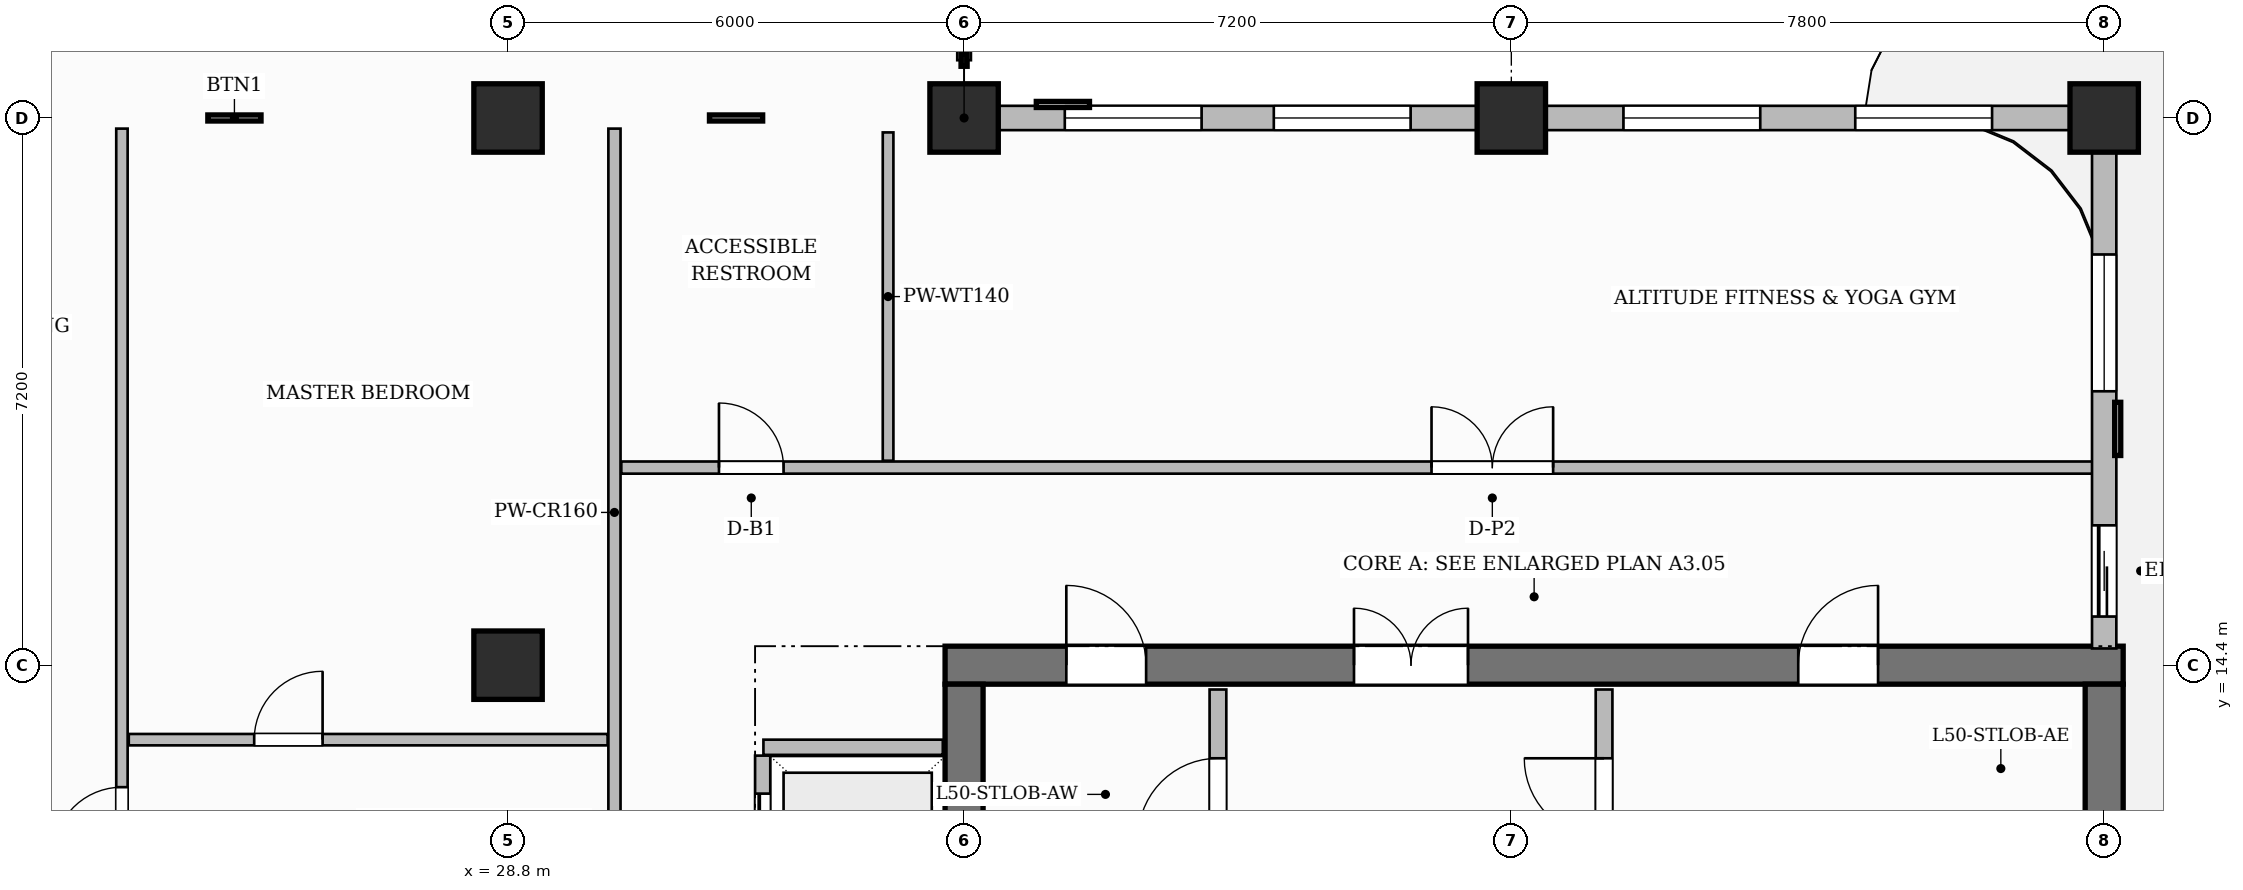
"""IFC4 building model, lengths in metres.
Left out: names, types, materials, properties, quantities, classifications, styles, units other than length and angle.
Written with IfcOpenShell. Run it as: python <this file> out.ifc"""

import sys

from ifc_helpers import new_model, si_unit, direction, frame, frame_2d, origin, origin_2d, place, context, subcontext, project, spatial, rectangle, extrude, source, transform, mapped, element, fill, save


model = new_model("IFC4")
c1 = context("Model", 3, precision=1e-05, world=origin(), true_north=direction((0.0, 1.0)))
c2 = subcontext(c1, "Body", "Model", "MODEL_VIEW")
j1 = project(units=[si_unit("LENGTHUNIT", "METRE"), si_unit("PLANEANGLEUNIT", "RADIAN")], contexts=[c1])
p1 = place(None, origin())
s1 = spatial("IfcSite", under=j1, at=p1, CompositionType="ELEMENT")
p2 = place(p1, origin())
s2 = spatial("IfcBuilding", under=s1, at=p2, CompositionType="ELEMENT")
p3 = place(p2, frame((0.0, 0.0, 201.9)))
s3 = spatial("IfcBuildingStorey", under=s2, at=p3, CompositionType="ELEMENT", Elevation=201.9)
p4 = place(p3, frame((34.55, 14.4, 0.0), z_axis=(0.0, 0.0, 1.0), x_axis=(1.0, 0.0, 0.0)))
e1 = element("IfcWall", 1, at=p4, inside=s3, PredefinedType="SHEAR", context=c2, shape_type="SweptSolid", body=[
    extrude(rectangle(XDim=15.5, YDim=0.5, at=frame_2d((7.75, 0.0))), origin(), (0.0, 0.0, 1.0), 3.85),
])
p5 = place(p4, frame((5.38, 0.0, 0.0)))
e2 = element("IfcOpeningElement", 2, at=p5, cuts=e1, PredefinedType="OPENING", context=c2, shape_type="SweptSolid", body=[
    extrude(rectangle(XDim=1.5, YDim=2.2, at=frame_2d((0.75, 1.1))), frame((0.0, 0.26, 0.0), z_axis=(0.0, -1.0, 0.0), x_axis=(1.0, 0.0, 0.0)), (0.0, 0.0, 1.0), 0.52),
])
p6 = place(p4, frame((1.595, 0.0, 0.0)))
e3 = element("IfcOpeningElement", 3, at=p6, cuts=e1, PredefinedType="OPENING", context=c2, shape_type="SweptSolid", body=[
    extrude(rectangle(XDim=1.05, YDim=2.15, at=frame_2d((0.525, 1.075))), frame((0.0, 0.26, 0.0), z_axis=(0.0, -1.0, 0.0), x_axis=(1.0, 0.0, 0.0)), (0.0, 0.0, 1.0), 0.52),
])
p7 = place(p4, frame((11.225, 0.0, 0.0)))
e4 = element("IfcOpeningElement", 4, at=p7, cuts=e1, PredefinedType="OPENING", context=c2, shape_type="SweptSolid", body=[
    extrude(rectangle(XDim=1.05, YDim=2.15, at=frame_2d((0.525, 1.075))), frame((0.0, 0.26, 0.0), z_axis=(0.0, -1.0, 0.0), x_axis=(1.0, 0.0, 0.0)), (0.0, 0.0, 1.0), 0.52),
])
for number, where, z_axis, x_axis in (
    (5, (34.8, 3.85, 0.0), (0.0, 0.0, 1.0), (0.0, 1.0, 0.0)),
    (6, (49.8, 3.85, 0.0), (0.0, 0.0, 1.0), (0.0, 1.0, 0.0)),
):
    element("IfcWall", number, at=place(p3, frame(where, z_axis=z_axis, x_axis=x_axis)), inside=s3, PredefinedType="SHEAR", context=c2, shape_type="SweptSolid", body=[
        extrude(rectangle(XDim=10.3, YDim=0.5, at=frame_2d((5.15, 0.0))), origin(), (0.0, 0.0, 1.0), 3.85),
    ])
m1 = source(origin(), c2, "Body", "SweptSolid", [
    extrude(rectangle(XDim=0.9, YDim=0.9, at=origin_2d()), origin(), (0.0, 0.0, 1.0), 3.85),
])
for number, where, z_axis, x_axis in (
    (7, (28.8, 14.4, 0.0), (0.0, 0.0, 1.0), (1.0, 0.0, 0.0)),
    (8, (28.8, 21.6, 0.0), (0.0, 0.0, 1.0), (1.0, 0.0, 0.0)),
    (9, (34.8, 21.6, 0.0), (0.0, 0.0, 1.0), (1.0, 0.0, 0.0)),
    (10, (42.0, 21.6, 0.0), (0.0, 0.0, 1.0), (1.0, 0.0, 0.0)),
    (11, (49.8, 21.6, 0.0), (0.0, 0.0, 1.0), (1.0, 0.0, 0.0)),
):
    element("IfcColumn", number, at=place(p3, frame(where, z_axis=z_axis, x_axis=x_axis)), inside=s3, PredefinedType="COLUMN", context=c2, shape_type="MappedRepresentation", body=[
        mapped(m1, transform((0.0, 0.0, 0.0), scale=1.0)),
    ])
p8 = place(p3, frame((38.14, 11.22, 0.0), z_axis=(0.0, 0.0, 1.0), x_axis=(0.0, 1.0, 0.0)))
e12 = element("IfcWall", 12, at=p8, inside=s3, PredefinedType="PARTITIONING", context=c2, shape_type="SweptSolid", body=[
    extrude(rectangle(XDim=2.86, YDim=0.22, at=frame_2d((1.43, 0.0))), origin(), (0.0, 0.0, 1.0), 3.6),
])
p9 = place(p8, frame((0.905, 0.0, 0.0)))
e13 = element("IfcOpeningElement", 13, at=p9, cuts=e12, PredefinedType="OPENING", context=c2, shape_type="SweptSolid", body=[
    extrude(rectangle(XDim=1.05, YDim=2.15, at=frame_2d((0.525, 1.075))), frame((0.0, 0.12, 0.0), z_axis=(0.0, -1.0, 0.0), x_axis=(1.0, 0.0, 0.0)), (0.0, 0.0, 1.0), 0.24),
])
p10 = place(p3, frame((43.22, 11.22, 0.0), z_axis=(0.0, 0.0, 1.0), x_axis=(0.0, 1.0, 0.0)))
e14 = element("IfcWall", 14, at=p10, inside=s3, PredefinedType="PARTITIONING", context=c2, shape_type="SweptSolid", body=[
    extrude(rectangle(XDim=2.86, YDim=0.22, at=frame_2d((1.43, 0.0))), origin(), (0.0, 0.0, 1.0), 3.6),
])
p11 = place(p10, frame((0.905, 0.0, 0.0)))
e15 = element("IfcOpeningElement", 15, at=p11, cuts=e14, PredefinedType="OPENING", context=c2, shape_type="SweptSolid", body=[
    extrude(rectangle(XDim=1.05, YDim=2.15, at=frame_2d((0.525, 1.075))), frame((0.0, 0.12, 0.0), z_axis=(0.0, -1.0, 0.0), x_axis=(1.0, 0.0, 0.0)), (0.0, 0.0, 1.0), 0.24),
])
p12 = place(p3, frame((32.16, 13.32, 0.0), z_axis=(0.0, 0.0, 1.0), x_axis=(1.0, 0.0, 0.0)))
e16 = element("IfcWall", 16, at=p12, inside=s3, PredefinedType="PARTITIONING", context=c2, shape_type="SweptSolid", body=[
    extrude(rectangle(XDim=2.36, YDim=0.2, at=frame_2d((1.18, 0.0))), origin(), (0.0, 0.0, 1.0), 3.6),
])
p13 = place(p3, frame((32.15, 4.39, 0.0), z_axis=(0.0, 0.0, 1.0), x_axis=(0.0, 1.0, 0.0)))
e17 = element("IfcWall", 17, at=p13, inside=s3, PredefinedType="PARTITIONING", context=c2, shape_type="SweptSolid", body=[
    extrude(rectangle(XDim=8.82, YDim=0.2, at=frame_2d((4.41, 0.0))), origin(), (0.0, 0.0, 1.0), 3.6),
])
p14 = place(p13, frame((0.5, 0.0, 0.0)))
e18 = element("IfcOpeningElement", 18, at=p14, cuts=e17, PredefinedType="OPENING", context=c2, shape_type="SweptSolid", body=[
    extrude(rectangle(XDim=1.1, YDim=2.2, at=frame_2d((0.55, 1.1))), frame((0.0, 0.11, 0.0), z_axis=(0.0, -1.0, 0.0), x_axis=(1.0, 0.0, 0.0)), (0.0, 0.0, 1.0), 0.22),
])
p15 = place(p13, frame((2.74, 0.0, 0.0)))
e19 = element("IfcOpeningElement", 19, at=p15, cuts=e17, PredefinedType="OPENING", context=c2, shape_type="SweptSolid", body=[
    extrude(rectangle(XDim=1.1, YDim=2.2, at=frame_2d((0.55, 1.1))), frame((0.0, 0.11, 0.0), z_axis=(0.0, -1.0, 0.0), x_axis=(1.0, 0.0, 0.0)), (0.0, 0.0, 1.0), 0.22),
])
p16 = place(p13, frame((4.98, 0.0, 0.0)))
e20 = element("IfcOpeningElement", 20, at=p16, cuts=e17, PredefinedType="OPENING", context=c2, shape_type="SweptSolid", body=[
    extrude(rectangle(XDim=1.1, YDim=2.2, at=frame_2d((0.55, 1.1))), frame((0.0, 0.11, 0.0), z_axis=(0.0, -1.0, 0.0), x_axis=(1.0, 0.0, 0.0)), (0.0, 0.0, 1.0), 0.22),
])
p17 = place(p13, frame((7.22, 0.0, 0.0)))
e21 = element("IfcOpeningElement", 21, at=p17, cuts=e17, PredefinedType="OPENING", context=c2, shape_type="SweptSolid", body=[
    extrude(rectangle(XDim=1.1, YDim=2.2, at=frame_2d((0.55, 1.1))), frame((0.0, 0.11, 0.0), z_axis=(0.0, -1.0, 0.0), x_axis=(1.0, 0.0, 0.0)), (0.0, 0.0, 1.0), 0.22),
])
p18 = place(p3, frame((30.2, 11.36, 0.0), z_axis=(0.0, 0.0, 1.0), x_axis=(0.0, 1.0, 0.0)))
e22 = element("IfcWall", 22, at=p18, inside=s3, PredefinedType="PARTITIONING", context=c2, shape_type="SweptSolid", body=[
    extrude(rectangle(XDim=10.1, YDim=0.16, at=frame_2d((5.05, 0.0))), origin(), (0.0, 0.0, 1.0), 3.6),
])
p19 = place(p3, frame((30.29, 17.0, 0.0), z_axis=(0.0, 0.0, 1.0), x_axis=(1.0, 0.0, 0.0)))
e23 = element("IfcWall", 23, at=p19, inside=s3, PredefinedType="PARTITIONING", context=c2, shape_type="SweptSolid", body=[
    extrude(rectangle(XDim=19.37, YDim=0.16, at=frame_2d((9.685, 0.0))), origin(), (0.0, 0.0, 1.0), 3.6),
])
p20 = place(p19, frame((1.285, 0.0, 0.0)))
e24 = element("IfcOpeningElement", 24, at=p20, cuts=e23, PredefinedType="OPENING", context=c2, shape_type="SweptSolid", body=[
    extrude(rectangle(XDim=0.85, YDim=2.1, at=frame_2d((0.425, 1.05))), frame((0.0, 0.09, 0.0), z_axis=(0.0, -1.0, 0.0), x_axis=(1.0, 0.0, 0.0)), (0.0, 0.0, 1.0), 0.18),
])
p21 = place(p19, frame((10.66, 0.0, 0.0)))
e25 = element("IfcOpeningElement", 25, at=p21, cuts=e23, PredefinedType="OPENING", context=c2, shape_type="SweptSolid", body=[
    extrude(rectangle(XDim=1.6, YDim=2.4, at=frame_2d((0.8, 1.2))), frame((0.0, 0.09, 0.0), z_axis=(0.0, -1.0, 0.0), x_axis=(1.0, 0.0, 0.0)), (0.0, 0.0, 1.0), 0.18),
])
p22 = place(p3, frame((33.8, 17.09, 0.0), z_axis=(0.0, 0.0, 1.0), x_axis=(0.0, 1.0, 0.0)))
e26 = element("IfcWall", 26, at=p22, inside=s3, PredefinedType="PARTITIONING", context=c2, shape_type="SweptSolid", body=[
    extrude(rectangle(XDim=4.32, YDim=0.14, at=frame_2d((2.16, 0.0))), origin(), (0.0, 0.0, 1.0), 3.6),
])
p23 = place(p3, frame((23.72, 11.36, 0.0), z_axis=(0.0, 0.0, 1.0), x_axis=(0.0, 1.0, 0.0)))
e27 = element("IfcWall", 27, at=p23, inside=s3, PredefinedType="PARTITIONING", context=c2, shape_type="SweptSolid", body=[
    extrude(rectangle(XDim=10.1, YDim=0.15, at=frame_2d((5.05, 0.0))), origin(), (0.0, 0.0, 1.0), 3.6),
])
p24 = place(p23, frame((0.535, 0.0, 0.0)))
e28 = element("IfcOpeningElement", 28, at=p24, cuts=e27, PredefinedType="OPENING", context=c2, shape_type="SweptSolid", body=[
    extrude(rectangle(XDim=0.9, YDim=2.15, at=frame_2d((0.45, 1.075))), frame((0.0, 0.085, 0.0), z_axis=(0.0, -1.0, 0.0), x_axis=(1.0, 0.0, 0.0)), (0.0, 0.0, 1.0), 0.17),
])
p25 = place(p3, frame((23.81, 13.42, 0.0), z_axis=(0.0, 0.0, 1.0), x_axis=(1.0, 0.0, 0.0)))
e29 = element("IfcWall", 29, at=p25, inside=s3, PredefinedType="PARTITIONING", context=c2, shape_type="SweptSolid", body=[
    extrude(rectangle(XDim=6.3, YDim=0.15, at=frame_2d((3.15, 0.0))), origin(), (0.0, 0.0, 1.0), 3.6),
])
p26 = place(p25, frame((1.65, 0.0, 0.0)))
e30 = element("IfcOpeningElement", 30, at=p26, cuts=e29, PredefinedType="OPENING", context=c2, shape_type="SweptSolid", body=[
    extrude(rectangle(XDim=0.9, YDim=2.15, at=frame_2d((0.45, 1.075))), frame((0.0, 0.085, 0.0), z_axis=(0.0, -1.0, 0.0), x_axis=(1.0, 0.0, 0.0)), (0.0, 0.0, 1.0), 0.17),
])
p27 = place(p3, frame((49.8, 14.62, 0.0), z_axis=(0.0, 0.0, 1.0), x_axis=(0.0, 1.0, 0.0)))
e31 = element("IfcWall", 31, at=p27, inside=s3, PredefinedType="SOLIDWALL", context=c2, shape_type="SweptSolid", body=[
    extrude(rectangle(XDim=6.93, YDim=0.32, at=frame_2d((3.465, 0.0))), origin(), (0.0, 0.0, 1.0), 3.085),
])
p28 = place(p27, frame((0.42, 0.0, 0.0)))
e32 = element("IfcOpeningElement", 32, at=p28, cuts=e31, PredefinedType="OPENING", context=c2, shape_type="SweptSolid", body=[
    extrude(rectangle(XDim=1.2, YDim=2.2, at=frame_2d((0.6, 1.1))), frame((0.0, 0.17, 0.0), z_axis=(0.0, -1.0, 0.0), x_axis=(1.0, 0.0, 0.0)), (0.0, 0.0, 1.0), 0.34),
])
p29 = place(p27, frame((3.384, 0.0, 0.8)))
e33 = element("IfcOpeningElement", 33, at=p29, cuts=e31, PredefinedType="OPENING", context=c2, shape_type="SweptSolid", body=[
    extrude(rectangle(XDim=1.8, YDim=1.85, at=frame_2d((0.9, 0.925))), frame((0.0, 0.17, 0.0), z_axis=(0.0, -1.0, 0.0), x_axis=(1.0, 0.0, 0.0)), (0.0, 0.0, 1.0), 0.34),
])
p30 = place(p3, frame((34.8, 21.6, 0.0), z_axis=(0.0, 0.0, 1.0), x_axis=(1.0, 0.0, 0.0)))
e34 = element("IfcWall", 34, at=p30, inside=s3, PredefinedType="SOLIDWALL", context=c2, shape_type="SweptSolid", body=[
    extrude(rectangle(XDim=15.0, YDim=0.32, at=frame_2d((7.5, 0.0))), origin(), (0.0, 0.0, 1.0), 3.085),
])
p31 = place(p30, frame((1.325, 0.0, 0.8)))
e35 = element("IfcOpeningElement", 35, at=p31, cuts=e34, PredefinedType="OPENING", context=c2, shape_type="SweptSolid", body=[
    extrude(rectangle(XDim=1.8, YDim=1.85, at=frame_2d((0.9, 0.925))), frame((0.0, 0.17, 0.0), z_axis=(0.0, -1.0, 0.0), x_axis=(1.0, 0.0, 0.0)), (0.0, 0.0, 1.0), 0.34),
])
p32 = place(p30, frame((4.075, 0.0, 0.8)))
e36 = element("IfcOpeningElement", 36, at=p32, cuts=e34, PredefinedType="OPENING", context=c2, shape_type="SweptSolid", body=[
    extrude(rectangle(XDim=1.8, YDim=1.85, at=frame_2d((0.9, 0.925))), frame((0.0, 0.17, 0.0), z_axis=(0.0, -1.0, 0.0), x_axis=(1.0, 0.0, 0.0)), (0.0, 0.0, 1.0), 0.34),
])
p33 = place(p30, frame((8.675, 0.0, 0.8)))
e37 = element("IfcOpeningElement", 37, at=p33, cuts=e34, PredefinedType="OPENING", context=c2, shape_type="SweptSolid", body=[
    extrude(rectangle(XDim=1.8, YDim=1.85, at=frame_2d((0.9, 0.925))), frame((0.0, 0.17, 0.0), z_axis=(0.0, -1.0, 0.0), x_axis=(1.0, 0.0, 0.0)), (0.0, 0.0, 1.0), 0.34),
])
p34 = place(p30, frame((11.725, 0.0, 0.8)))
e38 = element("IfcOpeningElement", 38, at=p34, cuts=e34, PredefinedType="OPENING", context=c2, shape_type="SweptSolid", body=[
    extrude(rectangle(XDim=1.8, YDim=1.85, at=frame_2d((0.9, 0.925))), frame((0.0, 0.17, 0.0), z_axis=(0.0, -1.0, 0.0), x_axis=(1.0, 0.0, 0.0)), (0.0, 0.0, 1.0), 0.34),
])
m2 = source(origin(), c2, "Body", "SweptSolid", [
    extrude(rectangle(XDim=1.05, YDim=2.15, at=frame_2d((0.525, 1.075))), frame((0.0, 0.025, 0.0), z_axis=(0.0, -1.0, 0.0), x_axis=(1.0, 0.0, 0.0)), (0.0, 0.0, 1.0), 0.05),
])
p35 = place(p9, origin())
e39 = element("IfcDoor", 39, at=p35, inside=s3, OperationType="SINGLE_SWING_LEFT", PredefinedType="DOOR", context=c2, shape_type="MappedRepresentation", body=[
    mapped(m2, transform((0.0, 0.0, 0.0), scale=1.0)),
])
fill(e13, e39)
p36 = place(p11, origin())
e40 = element("IfcDoor", 40, at=p36, inside=s3, OperationType="SINGLE_SWING_RIGHT", PredefinedType="DOOR", context=c2, shape_type="MappedRepresentation", body=[
    mapped(m2, transform((0.0, 0.0, 0.0), scale=1.0)),
])
fill(e15, e40)
m3 = source(origin(), c2, "Body", "SweptSolid", [
    extrude(rectangle(XDim=1.5, YDim=2.2, at=frame_2d((0.75, 1.1))), frame((0.0, 0.025, 0.0), z_axis=(0.0, -1.0, 0.0), x_axis=(1.0, 0.0, 0.0)), (0.0, 0.0, 1.0), 0.05),
])
p37 = place(p5, origin())
e41 = element("IfcDoor", 41, at=p37, inside=s3, OperationType="DOUBLE_DOOR_SINGLE_SWING", PredefinedType="DOOR", context=c2, shape_type="MappedRepresentation", body=[
    mapped(m3, transform((0.0, 0.0, 0.0), scale=1.0)),
])
fill(e2, e41)
p38 = place(p6, origin())
e42 = element("IfcDoor", 42, at=p38, inside=s3, OperationType="SINGLE_SWING_LEFT", PredefinedType="DOOR", context=c2, shape_type="MappedRepresentation", body=[
    mapped(m2, transform((0.0, 0.0, 0.0), scale=1.0)),
])
fill(e3, e42)
p39 = place(p7, origin())
e43 = element("IfcDoor", 43, at=p39, inside=s3, OperationType="SINGLE_SWING_RIGHT", PredefinedType="DOOR", context=c2, shape_type="MappedRepresentation", body=[
    mapped(m2, transform((0.0, 0.0, 0.0), scale=1.0)),
])
fill(e4, e43)
m4 = source(origin(), c2, "Body", "SweptSolid", [
    extrude(rectangle(XDim=0.85, YDim=2.1, at=frame_2d((0.425, 1.05))), frame((0.0, 0.025, 0.0), z_axis=(0.0, -1.0, 0.0), x_axis=(1.0, 0.0, 0.0)), (0.0, 0.0, 1.0), 0.05),
])
p40 = place(p20, origin())
e44 = element("IfcDoor", 44, at=p40, inside=s3, OperationType="SINGLE_SWING_LEFT", PredefinedType="DOOR", context=c2, shape_type="MappedRepresentation", body=[
    mapped(m4, transform((0.0, 0.0, 0.0), scale=1.0)),
])
fill(e24, e44)
m5 = source(origin(), c2, "Body", "SweptSolid", [
    extrude(rectangle(XDim=1.6, YDim=2.4, at=frame_2d((0.8, 1.2))), frame((0.0, 0.025, 0.0), z_axis=(0.0, -1.0, 0.0), x_axis=(1.0, 0.0, 0.0)), (0.0, 0.0, 1.0), 0.05),
])
p41 = place(p21, origin())
e45 = element("IfcDoor", 45, at=p41, inside=s3, OperationType="DOUBLE_DOOR_SINGLE_SWING", PredefinedType="DOOR", context=c2, shape_type="MappedRepresentation", body=[
    mapped(m5, transform((0.0, 0.0, 0.0), scale=1.0)),
])
fill(e25, e45)
m6 = source(origin(), c2, "Body", "SweptSolid", [
    extrude(rectangle(XDim=0.9, YDim=2.15, at=frame_2d((0.45, 1.075))), frame((0.0, 0.025, 0.0), z_axis=(0.0, -1.0, 0.0), x_axis=(1.0, 0.0, 0.0)), (0.0, 0.0, 1.0), 0.05),
])
p42 = place(p24, origin())
e46 = element("IfcDoor", 46, at=p42, inside=s3, OperationType="SINGLE_SWING_LEFT", PredefinedType="DOOR", context=c2, shape_type="MappedRepresentation", body=[
    mapped(m6, transform((0.0, 0.0, 0.0), scale=1.0)),
])
fill(e28, e46)
p43 = place(p26, origin())
e47 = element("IfcDoor", 47, at=p43, inside=s3, OperationType="SINGLE_SWING_RIGHT", PredefinedType="DOOR", context=c2, shape_type="MappedRepresentation", body=[
    mapped(m6, transform((0.0, 0.0, 0.0), scale=1.0)),
])
fill(e30, e47)
m7 = source(origin(), c2, "Body", "SweptSolid", [
    extrude(rectangle(XDim=1.1, YDim=2.2, at=frame_2d((0.55, 1.1))), frame((0.0, 0.025, 0.0), z_axis=(0.0, -1.0, 0.0), x_axis=(1.0, 0.0, 0.0)), (0.0, 0.0, 1.0), 0.05),
])
p44 = place(p17, origin())
e48 = element("IfcDoor", 48, at=p44, inside=s3, OperationType="SLIDING_TO_LEFT", PredefinedType="DOOR", context=c2, shape_type="MappedRepresentation", body=[
    mapped(m7, transform((0.0, 0.0, 0.0), scale=1.0)),
])
fill(e21, e48)
m8 = source(origin(), c2, "Body", "SweptSolid", [
    extrude(rectangle(XDim=1.2, YDim=2.2, at=frame_2d((0.6, 1.1))), frame((0.0, 0.025, 0.0), z_axis=(0.0, -1.0, 0.0), x_axis=(1.0, 0.0, 0.0)), (0.0, 0.0, 1.0), 0.05),
])
p45 = place(p28, origin())
e49 = element("IfcDoor", 49, at=p45, inside=s3, OperationType="SLIDING_TO_LEFT", PredefinedType="DOOR", context=c2, shape_type="MappedRepresentation", body=[
    mapped(m8, transform((0.0, 0.0, 0.0), scale=1.0)),
])
fill(e32, e49)
m9 = source(origin(), c2, "Body", "SweptSolid", [
    extrude(rectangle(XDim=1.8, YDim=1.85, at=frame_2d((0.9, 0.925))), frame((0.0, 0.03, 0.0), z_axis=(0.0, -1.0, 0.0), x_axis=(1.0, 0.0, 0.0)), (0.0, 0.0, 1.0), 0.06),
])
p46 = place(p29, origin())
e50 = element("IfcWindow", 50, at=p46, inside=s3, PartitioningType="DOUBLE_PANEL_VERTICAL", PredefinedType="WINDOW", context=c2, shape_type="MappedRepresentation", body=[
    mapped(m9, transform((0.0, 0.0, 0.0), scale=1.0)),
])
fill(e33, e50)
p47 = place(p31, origin())
e51 = element("IfcWindow", 51, at=p47, inside=s3, PartitioningType="DOUBLE_PANEL_VERTICAL", PredefinedType="WINDOW", context=c2, shape_type="MappedRepresentation", body=[
    mapped(m9, transform((0.0, 0.0, 0.0), scale=1.0)),
])
fill(e35, e51)
p48 = place(p32, origin())
e52 = element("IfcWindow", 52, at=p48, inside=s3, PartitioningType="DOUBLE_PANEL_VERTICAL", PredefinedType="WINDOW", context=c2, shape_type="MappedRepresentation", body=[
    mapped(m9, transform((0.0, 0.0, 0.0), scale=1.0)),
])
fill(e36, e52)
p49 = place(p33, origin())
e53 = element("IfcWindow", 53, at=p49, inside=s3, PartitioningType="DOUBLE_PANEL_VERTICAL", PredefinedType="WINDOW", context=c2, shape_type="MappedRepresentation", body=[
    mapped(m9, transform((0.0, 0.0, 0.0), scale=1.0)),
])
fill(e37, e53)
p50 = place(p34, origin())
e54 = element("IfcWindow", 54, at=p50, inside=s3, PartitioningType="DOUBLE_PANEL_VERTICAL", PredefinedType="WINDOW", context=c2, shape_type="MappedRepresentation", body=[
    mapped(m9, transform((0.0, 0.0, 0.0), scale=1.0)),
])
fill(e38, e54)
save(model, sys.argv[1])
